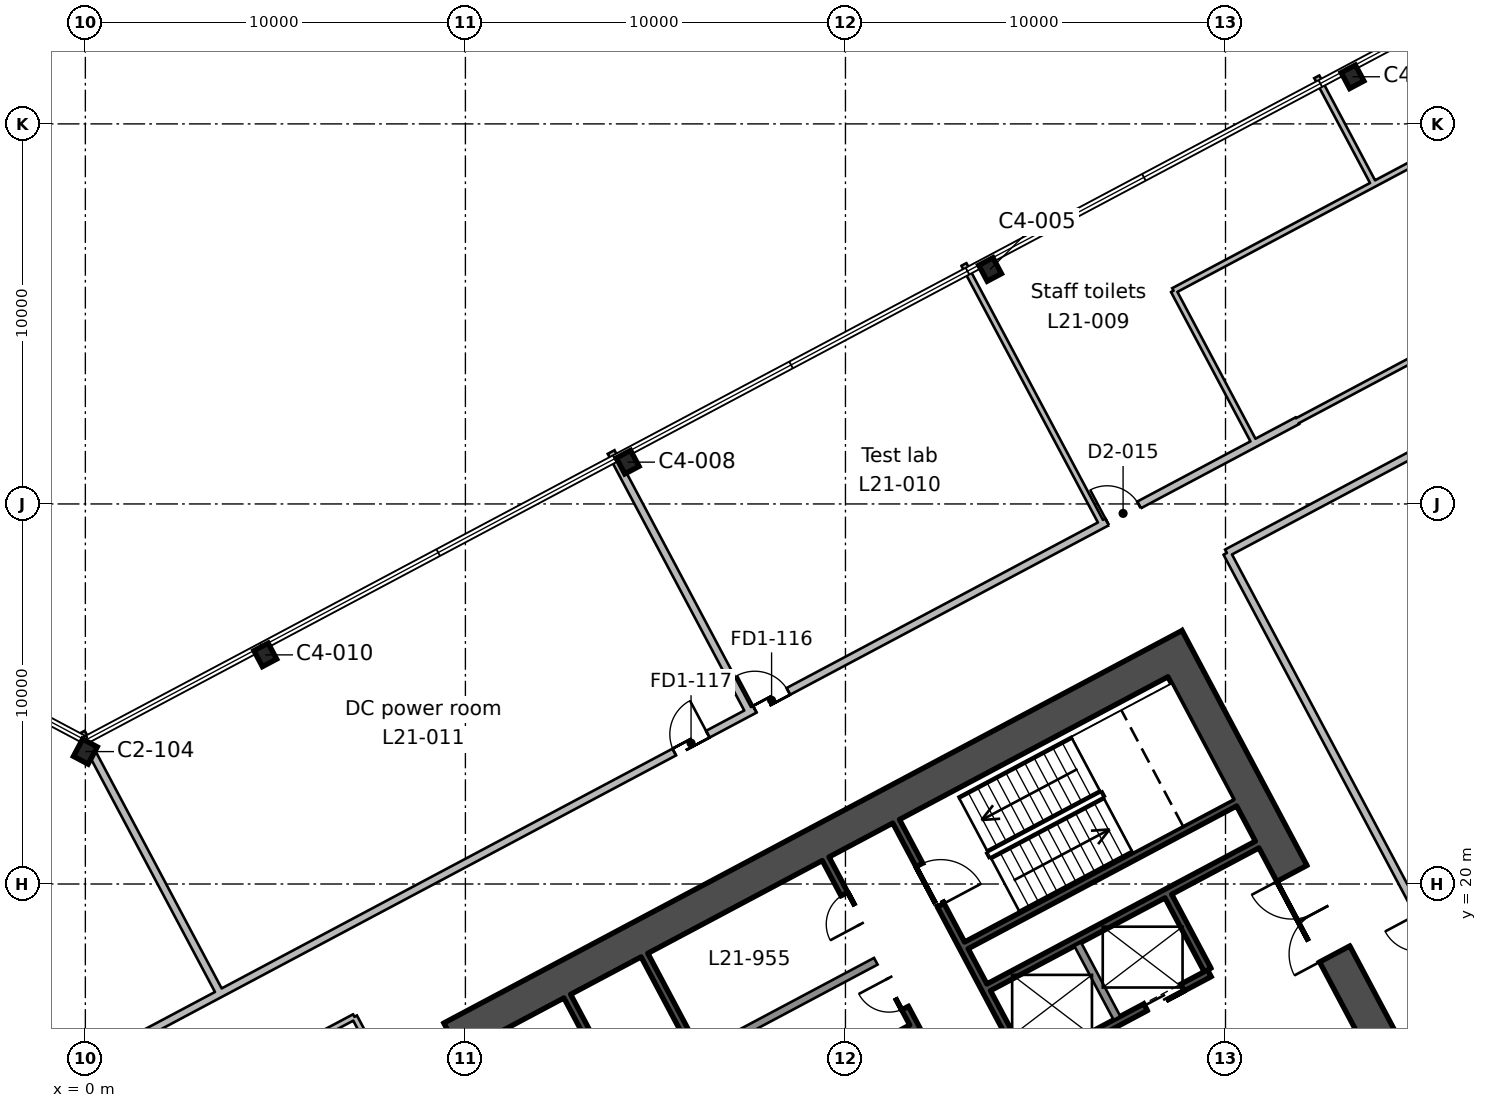
"""IFC4 building model, lengths in metres.
Left out: names, types, materials, properties, quantities, classifications, styles, units other than length and angle.
Written with IfcOpenShell. Run it as: python <this file> out.ifc"""

import sys

from ifc_helpers import new_model, si_unit, direction, frame, frame_2d, origin, origin_2d, place, context, subcontext, project, spatial, rectangle, i_section, extrude, element, fill, save


model = new_model("IFC4")
c1 = context("Model", 3, precision=1e-05, world=origin(), true_north=direction((0.0, 1.0)))
c2 = subcontext(c1, "Body", "Model", "MODEL_VIEW")
j1 = project(units=[si_unit("LENGTHUNIT", "METRE"), si_unit("PLANEANGLEUNIT", "RADIAN")], contexts=[c1])
p1 = place(None, origin())
s1 = spatial("IfcSite", under=j1, at=p1, CompositionType="ELEMENT")
p2 = place(p1, origin())
s2 = spatial("IfcBuilding", under=s1, at=p2, CompositionType="ELEMENT")
p3 = place(p2, frame((0.0, 0.0, 107.6)))
s3 = spatial("IfcBuildingStorey", under=s2, at=p3, CompositionType="ELEMENT", Elevation=107.6)
p4 = place(p3, frame((0.0, 23.484, 0.0), z_axis=(0.0, 0.0, 1.0), x_axis=(-0.882947592859, 0.469471562786, 0.0)))
e1 = element("IfcColumn", 1, at=p4, inside=s3, PredefinedType="COLUMN", context=c2, shape_type="SweptSolid", body=[
    extrude(i_section(OverallWidth=0.437, OverallDepth=0.513, WebThickness=0.061, FlangeThickness=0.097, FilletRadius=0.015, at=origin_2d()), origin(), (0.0, 0.0, 1.0), 4.6),
])
for number, where, z_axis, x_axis in (
    (2, (4.734, 26.029, 0.0), (0.0, 0.0, 1.0), (-0.883, -0.469, 0.0)),
    (3, (14.27, 31.1, 0.0), (0.0, 0.0, 1.0), (-0.883, -0.469, 0.0)),
    (4, (23.806, 36.17, 0.0), (0.0, 0.0, 1.0), (-0.883, -0.469, 0.0)),
    (5, (33.342, 41.24, 0.0), (0.0, 0.0, 1.0), (-0.883, -0.469, 0.0)),
):
    element("IfcColumn", number, at=place(p3, frame(where, z_axis=z_axis, x_axis=x_axis)), inside=s3, PredefinedType="COLUMN", context=c2, shape_type="SweptSolid", body=[
        extrude(i_section(OverallWidth=0.424, OverallDepth=0.475, WebThickness=0.048, FlangeThickness=0.077, FilletRadius=0.015, at=origin_2d()), origin(), (0.0, 0.0, 1.0), 4.6),
    ])
p5 = place(p3, frame((19.219, -1.107, 0.0), z_axis=(0.0, 0.0, 1.0), x_axis=(-0.46947084998, 0.882947971864, 0.0)))
e6 = element("IfcWall", 6, at=p5, inside=s3, PredefinedType="SHEAR", context=c2, shape_type="SweptSolid", body=[
    extrude(rectangle(XDim=20.0, YDim=0.9, at=frame_2d((10.0, 0.0))), origin(), (0.0, 0.0, 1.0), 4.6),
])
p6 = place(p5, frame((7.0, 0.0, 0.0)))
e7 = element("IfcOpeningElement", 7, at=p6, cuts=e6, PredefinedType="OPENING", context=c2, shape_type="SweptSolid", body=[
    extrude(rectangle(XDim=2.4, YDim=2.4, at=frame_2d((1.2, 1.2))), frame((0.0, 0.46, 0.0), z_axis=(0.0, -1.0, 0.0), x_axis=(1.0, 0.0, 0.0)), (0.0, 0.0, 1.0), 0.92),
])
p7 = place(p3, frame((37.849, 8.799, 0.0), z_axis=(0.0, 0.0, 1.0), x_axis=(-0.469465789982, 0.882950662289, 0.0)))
e8 = element("IfcWall", 8, at=p7, inside=s3, PredefinedType="SHEAR", context=c2, shape_type="SweptSolid", body=[
    extrude(rectangle(XDim=20.0, YDim=0.9, at=frame_2d((10.0, 0.0))), origin(), (0.0, 0.0, 1.0), 4.6),
])
p8 = place(p7, frame((10.6, 0.0, 0.0)))
e9 = element("IfcOpeningElement", 9, at=p8, cuts=e8, PredefinedType="OPENING", context=c2, shape_type="SweptSolid", body=[
    extrude(rectangle(XDim=2.4, YDim=2.4, at=frame_2d((1.2, 1.2))), frame((0.0, 0.46, 0.0), z_axis=(0.0, -1.0, 0.0), x_axis=(1.0, 0.0, 0.0)), (0.0, 0.0, 1.0), 0.92),
])
p9 = place(p3, frame((10.438, 16.366, 0.0), z_axis=(0.0, 0.0, 1.0), x_axis=(0.88294509198, 0.469476266226, 0.0)))
e10 = element("IfcWall", 10, at=p9, inside=s3, PredefinedType="SHEAR", context=c2, shape_type="SweptSolid", body=[
    extrude(rectangle(XDim=20.2, YDim=0.9, at=frame_2d((10.1, 0.0))), origin(), (0.0, 0.0, 1.0), 4.6),
])
p10 = place(p3, frame((14.394, 13.826, 0.0), z_axis=(0.0, 0.0, 1.0), x_axis=(-0.469494272526, 0.882935517501, 0.0)))
e11 = element("IfcWall", 11, at=p10, inside=s3, PredefinedType="SHEAR", context=c2, shape_type="SweptSolid", body=[
    extrude(rectangle(XDim=3.65, YDim=0.2, at=frame_2d((1.825, 0.0))), origin(), (0.0, 0.0, 1.0), 4.6),
])
p11 = place(p3, frame((18.138, 11.683, 0.0), z_axis=(0.0, 0.0, 1.0), x_axis=(-0.469480409012, 0.88294288918, 0.0)))
e12 = element("IfcWall", 12, at=p11, inside=s3, PredefinedType="SHEAR", context=c2, shape_type="SweptSolid", body=[
    extrude(rectangle(XDim=7.3, YDim=0.2, at=frame_2d((3.65, 0.0))), origin(), (0.0, 0.0, 1.0), 4.6),
])
p12 = place(p3, frame((22.906, 14.218, 0.0), z_axis=(0.0, 0.0, 1.0), x_axis=(-0.469480409012, 0.88294288918, 0.0)))
e13 = element("IfcWall", 13, at=p12, inside=s3, PredefinedType="SHEAR", context=c2, shape_type="SweptSolid", body=[
    extrude(rectangle(XDim=7.3, YDim=0.2, at=frame_2d((3.65, 0.0))), origin(), (0.0, 0.0, 1.0), 4.6),
])
p13 = place(p12, frame((2.85, 0.0, 0.0)))
e14 = element("IfcOpeningElement", 14, at=p13, cuts=e13, PredefinedType="OPENING", context=c2, shape_type="SweptSolid", body=[
    extrude(rectangle(XDim=0.9, YDim=2.1, at=frame_2d((0.45, 1.05))), frame((0.0, 0.11, 0.0), z_axis=(0.0, -1.0, 0.0), x_axis=(1.0, 0.0, 0.0)), (0.0, 0.0, 1.0), 0.22),
])
p14 = place(p12, frame((5.35, 0.0, 0.0)))
e15 = element("IfcOpeningElement", 15, at=p14, cuts=e13, PredefinedType="OPENING", context=c2, shape_type="SweptSolid", body=[
    extrude(rectangle(XDim=0.9, YDim=2.1, at=frame_2d((0.45, 1.05))), frame((0.0, 0.11, 0.0), z_axis=(0.0, -1.0, 0.0), x_axis=(1.0, 0.0, 0.0)), (0.0, 0.0, 1.0), 0.22),
])
p15 = place(p3, frame((24.76, 15.204, 0.0), z_axis=(0.0, 0.0, 1.0), x_axis=(-0.469494272526, 0.882935517501, 0.0)))
e16 = element("IfcWall", 16, at=p15, inside=s3, PredefinedType="SHEAR", context=c2, shape_type="SweptSolid", body=[
    extrude(rectangle(XDim=7.3, YDim=0.2, at=frame_2d((3.65, 0.0))), origin(), (0.0, 0.0, 1.0), 4.6),
])
p16 = place(p15, frame((4.8, 0.0, 0.0)))
e17 = element("IfcOpeningElement", 17, at=p16, cuts=e16, PredefinedType="OPENING", context=c2, shape_type="SweptSolid", body=[
    extrude(rectangle(XDim=1.2, YDim=2.1, at=frame_2d((0.6, 1.05))), frame((0.0, 0.11, 0.0), z_axis=(0.0, -1.0, 0.0), x_axis=(1.0, 0.0, 0.0)), (0.0, 0.0, 1.0), 0.22),
])
p17 = place(p3, frame((27.144, 16.471, 0.0), z_axis=(0.0, 0.0, 1.0), x_axis=(-0.469401318492, 0.882984938828, 0.0)))
e18 = element("IfcWall", 18, at=p17, inside=s3, PredefinedType="SOLIDWALL", context=c2, shape_type="SweptSolid", body=[
    extrude(rectangle(XDim=2.2, YDim=0.2, at=frame_2d((1.1, 0.0))), origin(), (0.0, 0.0, 1.0), 4.6),
])
p18 = place(p3, frame((29.528, 17.739, 0.0), z_axis=(0.0, 0.0, 1.0), x_axis=(-0.469401318492, 0.882984938828, 0.0)))
e19 = element("IfcWall", 19, at=p18, inside=s3, PredefinedType="SHEAR", context=c2, shape_type="SweptSolid", body=[
    extrude(rectangle(XDim=2.2, YDim=0.2, at=frame_2d((1.1, 0.0))), origin(), (0.0, 0.0, 1.0), 4.6),
])
p19 = place(p3, frame((24.807, 15.116, 0.0), z_axis=(0.0, 0.0, 1.0), x_axis=(0.882942972946, 0.469480251476, 0.0)))
e20 = element("IfcWall", 20, at=p19, inside=s3, PredefinedType="SHEAR", context=c2, shape_type="SweptSolid", body=[
    extrude(rectangle(XDim=5.4, YDim=0.2, at=frame_2d((2.7, 0.0))), origin(), (0.0, 0.0, 1.0), 4.6),
])
p20 = place(p19, frame((0.8, 0.0, 0.0)))
e21 = element("IfcOpeningElement", 21, at=p20, cuts=e20, PredefinedType="OPENING", context=c2, shape_type="SweptSolid", body=[
    extrude(rectangle(XDim=1.1, YDim=2.1, at=frame_2d((0.55, 1.05))), frame((0.0, 0.11, 0.0), z_axis=(0.0, -1.0, 0.0), x_axis=(1.0, 0.0, 0.0)), (0.0, 0.0, 1.0), 0.22),
])
p21 = place(p19, frame((3.5, 0.0, 0.0)))
e22 = element("IfcOpeningElement", 22, at=p21, cuts=e20, PredefinedType="OPENING", context=c2, shape_type="SweptSolid", body=[
    extrude(rectangle(XDim=1.1, YDim=2.1, at=frame_2d((0.55, 1.05))), frame((0.0, 0.11, 0.0), z_axis=(0.0, -1.0, 0.0), x_axis=(1.0, 0.0, 0.0)), (0.0, 0.0, 1.0), 0.22),
])
p22 = place(p3, frame((17.147, 13.761, 0.0), z_axis=(0.0, 0.0, 1.0), x_axis=(0.882964314875, 0.469440111896, 0.0)))
e23 = element("IfcWall", 23, at=p22, inside=s3, PredefinedType="SHEAR", context=c2, shape_type="SweptSolid", body=[
    extrude(rectangle(XDim=5.2, YDim=0.2, at=frame_2d((2.6, 0.0))), origin(), (0.0, 0.0, 1.0), 4.6),
])
p23 = place(p3, frame((23.769, 17.282, 0.0), z_axis=(0.0, 0.0, 1.0), x_axis=(0.882940221191, 0.469485426614, 0.0)))
e24 = element("IfcWall", 24, at=p23, inside=s3, PredefinedType="SHEAR", context=c2, shape_type="SweptSolid", body=[
    extrude(rectangle(XDim=8.0, YDim=0.2, at=frame_2d((4.0, 0.0))), origin(), (0.0, 0.0, 1.0), 4.6),
])
p24 = place(p3, frame((23.182, 18.385, 0.0), z_axis=(0.0, 0.0, 1.0), x_axis=(0.88295287151, 0.469461634952, 0.0)))
e25 = element("IfcWall", 25, at=p24, inside=s3, PredefinedType="SHEAR", context=c2, shape_type="SweptSolid", body=[
    extrude(rectangle(XDim=8.0, YDim=0.2, at=frame_2d((4.0, 0.0))), origin(), (0.0, 0.0, 1.0), 4.6),
])
p25 = place(p3, frame((16.208, 15.527, 0.0), z_axis=(0.0, 0.0, 1.0), x_axis=(0.882953967957, 0.469459572775, 0.0)))
e26 = element("IfcWall", 26, at=p25, inside=s3, PredefinedType="SOLIDWALL", context=c2, shape_type="SweptSolid", body=[
    extrude(rectangle(XDim=5.2, YDim=0.2, at=frame_2d((2.6, 0.0))), origin(), (0.0, 0.0, 1.0), 4.6),
])
p26 = place(p3, frame((-32.541, 32.535, 0.0), z_axis=(0.0, 0.0, 1.0), x_axis=(0.882951675281, -0.469463884787, 0.0)))
e27 = element("IfcWall", 27, at=p26, inside=s3, PredefinedType="PARTITIONING", context=c2, shape_type="SweptSolid", body=[
    extrude(rectangle(XDim=36.855, YDim=0.2, at=frame_2d((18.427, 0.0))), origin(), (0.0, 0.0, 1.0), 4.15),
])
p27 = place(p26, frame((17.95, 0.0, 0.0)))
e28 = element("IfcOpeningElement", 28, at=p27, cuts=e27, PredefinedType="OPENING", context=c2, shape_type="SweptSolid", body=[
    extrude(rectangle(XDim=1.0, YDim=2.1, at=frame_2d((0.5, 1.05))), frame((0.0, 0.11, 0.0), z_axis=(0.0, -1.0, 0.0), x_axis=(1.0, 0.0, 0.0)), (0.0, 0.0, 1.0), 0.22),
])
p28 = place(p26, frame((14.75, 0.0, 0.0)))
e29 = element("IfcOpeningElement", 29, at=p28, cuts=e27, PredefinedType="OPENING", context=c2, shape_type="SweptSolid", body=[
    extrude(rectangle(XDim=1.0, YDim=2.1, at=frame_2d((0.5, 1.05))), frame((0.0, 0.11, 0.0), z_axis=(0.0, -1.0, 0.0), x_axis=(1.0, 0.0, 0.0)), (0.0, 0.0, 1.0), 0.22),
])
p29 = place(p3, frame((0.0, 15.233, 0.0), z_axis=(0.0, 0.0, 1.0), x_axis=(0.882948052406, 0.469470698502, 0.0)))
e30 = element("IfcWall", 30, at=p29, inside=s3, PredefinedType="PARTITIONING", context=c2, shape_type="SweptSolid", body=[
    extrude(rectangle(XDim=36.115, YDim=0.2, at=frame_2d((18.058, 0.0))), origin(), (0.0, 0.0, 1.0), 4.15),
])
p30 = place(p29, frame((30.45, 0.0, 0.0)))
e31 = element("IfcOpeningElement", 31, at=p30, cuts=e30, PredefinedType="OPENING", context=c2, shape_type="SweptSolid", body=[
    extrude(rectangle(XDim=0.95, YDim=2.1, at=frame_2d((0.475, 1.05))), frame((0.0, 0.11, 0.0), z_axis=(0.0, -1.0, 0.0), x_axis=(1.0, 0.0, 0.0)), (0.0, 0.0, 1.0), 0.22),
])
p31 = place(p29, frame((19.95, 0.0, 0.0)))
e32 = element("IfcOpeningElement", 32, at=p31, cuts=e30, PredefinedType="OPENING", context=c2, shape_type="SweptSolid", body=[
    extrude(rectangle(XDim=1.0, YDim=2.1, at=frame_2d((0.5, 1.05))), frame((0.0, 0.11, 0.0), z_axis=(0.0, -1.0, 0.0), x_axis=(1.0, 0.0, 0.0)), (0.0, 0.0, 1.0), 0.22),
])
p32 = place(p29, frame((17.55, 0.0, 0.0)))
e33 = element("IfcOpeningElement", 33, at=p32, cuts=e30, PredefinedType="OPENING", context=c2, shape_type="SweptSolid", body=[
    extrude(rectangle(XDim=1.0, YDim=2.1, at=frame_2d((0.5, 1.05))), frame((0.0, 0.11, 0.0), z_axis=(0.0, -1.0, 0.0), x_axis=(1.0, 0.0, 0.0)), (0.0, 0.0, 1.0), 0.22),
])
p33 = place(p3, frame((-0.105, 23.984, 0.0), z_axis=(0.0, 0.0, 1.0), x_axis=(0.469391658377, -0.882990074149, 0.0)))
e34 = element("IfcWall", 34, at=p33, inside=s3, PredefinedType="PARTITIONING", context=c2, shape_type="SweptSolid", body=[
    extrude(rectangle(XDim=7.776, YDim=0.2, at=frame_2d((3.888, 0.0))), origin(), (0.0, 0.0, 1.0), 4.15),
])
p34 = place(p3, frame((13.834, 31.366, 0.0), z_axis=(0.0, 0.0, 1.0), x_axis=(0.469415477281, -0.882977411766, 0.0)))
e35 = element("IfcWall", 35, at=p34, inside=s3, PredefinedType="PARTITIONING", context=c2, shape_type="SweptSolid", body=[
    extrude(rectangle(XDim=7.75, YDim=0.2, at=frame_2d((3.875, 0.0))), origin(), (0.0, 0.0, 1.0), 4.15),
])
p35 = place(p3, frame((62.372, 17.93, 0.0), z_axis=(0.0, 0.0, 1.0), x_axis=(-0.88295234377, -0.469462627513, 0.0)))
e36 = element("IfcWall", 36, at=p35, inside=s3, PredefinedType="PARTITIONING", context=c2, shape_type="SweptSolid", body=[
    extrude(rectangle(XDim=55.237, YDim=0.2, at=frame_2d((27.619, 0.0))), origin(), (0.0, 0.0, 1.0), 4.15),
])
p36 = place(p35, frame((38.75, 0.0, 0.0)))
e37 = element("IfcOpeningElement", 37, at=p36, cuts=e36, PredefinedType="OPENING", context=c2, shape_type="SweptSolid", body=[
    extrude(rectangle(XDim=1.0, YDim=2.1, at=frame_2d((0.5, 1.05))), frame((0.0, 0.11, 0.0), z_axis=(0.0, -1.0, 0.0), x_axis=(1.0, 0.0, 0.0)), (0.0, 0.0, 1.0), 0.22),
])
p37 = place(p35, frame((27.15, 0.0, 0.0)))
e38 = element("IfcOpeningElement", 38, at=p37, cuts=e36, PredefinedType="OPENING", context=c2, shape_type="SweptSolid", body=[
    extrude(rectangle(XDim=1.0, YDim=2.1, at=frame_2d((0.5, 1.05))), frame((0.0, 0.11, 0.0), z_axis=(0.0, -1.0, 0.0), x_axis=(1.0, 0.0, 0.0)), (0.0, 0.0, 1.0), 0.22),
])
p38 = place(p35, frame((20.85, 0.0, 0.0)))
e39 = element("IfcOpeningElement", 39, at=p38, cuts=e36, PredefinedType="OPENING", context=c2, shape_type="SweptSolid", body=[
    extrude(rectangle(XDim=1.0, YDim=2.1, at=frame_2d((0.5, 1.05))), frame((0.0, 0.11, 0.0), z_axis=(0.0, -1.0, 0.0), x_axis=(1.0, 0.0, 0.0)), (0.0, 0.0, 1.0), 0.22),
])
p39 = place(p3, frame((23.117, 36.302, 0.0), z_axis=(0.0, 0.0, 1.0), x_axis=(0.469538267285, -0.882912122215, 0.0)))
e40 = element("IfcWall", 40, at=p39, inside=s3, PredefinedType="PARTITIONING", context=c2, shape_type="SweptSolid", body=[
    extrude(rectangle(XDim=7.75, YDim=0.15, at=frame_2d((3.875, 0.0))), origin(), (0.0, 0.0, 1.0), 4.15),
])
p40 = place(p3, frame((30.761, 31.608, 0.0), z_axis=(0.0, 0.0, 1.0), x_axis=(-0.469369141446, 0.883002043632, 0.0)))
e41 = element("IfcWall", 41, at=p40, inside=s3, PredefinedType="PARTITIONING", context=c2, shape_type="SweptSolid", body=[
    extrude(rectangle(XDim=4.534, YDim=0.15, at=frame_2d((2.267, 0.0))), origin(), (0.0, 0.0, 1.0), 4.15),
])
p41 = place(p3, frame((28.633, 35.611, 0.0), z_axis=(0.0, 0.0, 1.0), x_axis=(0.882899375274, 0.469562235642, 0.0)))
e42 = element("IfcWall", 42, at=p41, inside=s3, PredefinedType="PARTITIONING", context=c2, shape_type="SweptSolid", body=[
    extrude(rectangle(XDim=5.905, YDim=0.15, at=frame_2d((2.953, 0.0))), origin(), (0.0, 0.0, 1.0), 4.15),
])
p42 = place(p3, frame((31.888, 32.188, 0.0), z_axis=(0.0, 0.0, 1.0), x_axis=(0.882949135821, 0.469468660884, 0.0)))
e43 = element("IfcWall", 43, at=p42, inside=s3, PredefinedType="PARTITIONING", context=c2, shape_type="SweptSolid", body=[
    extrude(rectangle(XDim=21.184, YDim=0.15, at=frame_2d((10.592, 0.0))), origin(), (0.0, 0.0, 1.0), 4.15),
])
p43 = place(p42, frame((10.05, 0.0, 0.0)))
e44 = element("IfcOpeningElement", 44, at=p43, cuts=e43, PredefinedType="OPENING", context=c2, shape_type="SweptSolid", body=[
    extrude(rectangle(XDim=1.0, YDim=2.1, at=frame_2d((0.5, 1.05))), frame((0.0, 0.085, 0.0), z_axis=(0.0, -1.0, 0.0), x_axis=(1.0, 0.0, 0.0)), (0.0, 0.0, 1.0), 0.17),
])
p44 = place(p3, frame((32.402, 41.239, 0.0), z_axis=(0.0, 0.0, 1.0), x_axis=(0.469447181805, -0.882960556025, 0.0)))
e45 = element("IfcWall", 45, at=p44, inside=s3, PredefinedType="PARTITIONING", context=c2, shape_type="SweptSolid", body=[
    extrude(rectangle(XDim=3.199, YDim=0.15, at=frame_2d((1.6, 0.0))), origin(), (0.0, 0.0, 1.0), 4.15),
])
p45 = place(p3, frame((33.847, 38.384, 0.0), z_axis=(0.0, 0.0, 1.0), x_axis=(0.882976275084, 0.469417615391, 0.0)))
e46 = element("IfcWall", 46, at=p45, inside=s3, PredefinedType="PARTITIONING", context=c2, shape_type="SweptSolid", body=[
    extrude(rectangle(XDim=18.094, YDim=0.15, at=frame_2d((9.047, 0.0))), origin(), (0.0, 0.0, 1.0), 4.15),
])
p46 = place(p3, frame((40.599, 8.846, 0.0), z_axis=(0.0, 0.0, 1.0), x_axis=(-0.469482321543, 0.882941872242, 0.0)))
e47 = element("IfcWall", 47, at=p46, inside=s3, PredefinedType="PARTITIONING", context=c2, shape_type="SweptSolid", body=[
    extrude(rectangle(XDim=22.5, YDim=0.2, at=frame_2d((11.25, 0.0))), origin(), (0.0, 0.0, 1.0), 4.15),
])
p47 = place(p46, frame((10.75, 0.0, 0.0)))
e48 = element("IfcOpeningElement", 48, at=p47, cuts=e47, PredefinedType="OPENING", context=c2, shape_type="SweptSolid", body=[
    extrude(rectangle(XDim=1.0, YDim=2.1, at=frame_2d((0.5, 1.05))), frame((0.0, 0.11, 0.0), z_axis=(0.0, -1.0, 0.0), x_axis=(1.0, 0.0, 0.0)), (0.0, 0.0, 1.0), 0.22),
])
p48 = place(p3, frame((30.036, 28.712, 0.0), z_axis=(0.0, 0.0, 1.0), x_axis=(0.882948586986, 0.469469693099, 0.0)))
e49 = element("IfcWall", 49, at=p48, inside=s3, PredefinedType="PARTITIONING", context=c2, shape_type="SweptSolid", body=[
    extrude(rectangle(XDim=13.452, YDim=0.2, at=frame_2d((6.726, 0.0))), origin(), (0.0, 0.0, 1.0), 4.15),
])
p49 = place(p3, frame((8.625, 13.6, 0.0), z_axis=(0.0, 0.0, 1.0), x_axis=(-0.469417352915, 0.882976414624, 0.0)))
e50 = element("IfcWall", 50, at=p49, inside=s3, PredefinedType="PARTITIONING", context=c2, shape_type="SweptSolid", body=[
    extrude(rectangle(XDim=3.291, YDim=0.15, at=frame_2d((1.646, 0.0))), origin(), (0.0, 0.0, 1.0), 4.15),
])
p50 = place(p3, frame((7.08, 16.506, 0.0), z_axis=(0.0, 0.0, 1.0), x_axis=(-0.882936403153, -0.469492606957, 0.0)))
e51 = element("IfcWall", 51, at=p50, inside=s3, PredefinedType="PARTITIONING", context=c2, shape_type="SweptSolid", body=[
    extrude(rectangle(XDim=6.19, YDim=0.15, at=frame_2d((3.095, 0.0))), origin(), (0.0, 0.0, 1.0), 4.15),
])
p51 = place(p8, origin())
e52 = element("IfcDoor", 52, at=p51, inside=s3, OperationType="DOUBLE_DOOR_SINGLE_SWING", PredefinedType="DOOR", context=c2, shape_type="SweptSolid", body=[
    extrude(rectangle(XDim=2.4, YDim=2.4, at=frame_2d((1.2, 1.2))), frame((0.0, 0.025, 0.0), z_axis=(0.0, -1.0, 0.0), x_axis=(1.0, 0.0, 0.0)), (0.0, 0.0, 1.0), 0.05),
])
fill(e9, e52)
p52 = place(p16, frame((1.2, 0.0, 0.0), z_axis=(0.0, 0.0, 1.0), x_axis=(-1.0, 0.0, 0.0)))
e53 = element("IfcDoor", 53, at=p52, inside=s3, OperationType="SINGLE_SWING_RIGHT", PredefinedType="DOOR", context=c2, shape_type="SweptSolid", body=[
    extrude(rectangle(XDim=1.2, YDim=2.1, at=frame_2d((0.6, 1.05))), frame((0.0, 0.025, 0.0), z_axis=(0.0, -1.0, 0.0), x_axis=(1.0, 0.0, 0.0)), (0.0, 0.0, 1.0), 0.05),
])
fill(e17, e53)
p53 = place(p21, origin())
e54 = element("IfcDoor", 54, at=p53, inside=s3, OperationType="DOUBLE_DOOR_SLIDING", PredefinedType="DOOR", context=c2, shape_type="SweptSolid", body=[
    extrude(rectangle(XDim=1.1, YDim=2.1, at=frame_2d((0.55, 1.05))), frame((0.0, 0.025, 0.0), z_axis=(0.0, -1.0, 0.0), x_axis=(1.0, 0.0, 0.0)), (0.0, 0.0, 1.0), 0.05),
])
fill(e22, e54)
p54 = place(p13, origin())
e55 = element("IfcDoor", 55, at=p54, inside=s3, OperationType="SINGLE_SWING_RIGHT", PredefinedType="DOOR", context=c2, shape_type="SweptSolid", body=[
    extrude(rectangle(XDim=0.9, YDim=2.1, at=frame_2d((0.45, 1.05))), frame((0.0, 0.025, 0.0), z_axis=(0.0, -1.0, 0.0), x_axis=(1.0, 0.0, 0.0)), (0.0, 0.0, 1.0), 0.05),
])
fill(e14, e55)
p55 = place(p14, origin())
e56 = element("IfcDoor", 56, at=p55, inside=s3, OperationType="SINGLE_SWING_LEFT", PredefinedType="DOOR", context=c2, shape_type="SweptSolid", body=[
    extrude(rectangle(XDim=0.9, YDim=2.1, at=frame_2d((0.45, 1.05))), frame((0.0, 0.025, 0.0), z_axis=(0.0, -1.0, 0.0), x_axis=(1.0, 0.0, 0.0)), (0.0, 0.0, 1.0), 0.05),
])
fill(e15, e56)
p56 = place(p30, origin())
e57 = element("IfcDoor", 57, at=p56, inside=s3, OperationType="SINGLE_SWING_LEFT", PredefinedType="DOOR", context=c2, shape_type="SweptSolid", body=[
    extrude(rectangle(XDim=0.95, YDim=2.1, at=frame_2d((0.475, 1.05))), frame((0.0, 0.025, 0.0), z_axis=(0.0, -1.0, 0.0), x_axis=(1.0, 0.0, 0.0)), (0.0, 0.0, 1.0), 0.05),
])
fill(e31, e57)
p57 = place(p31, origin())
e58 = element("IfcDoor", 58, at=p57, inside=s3, OperationType="SINGLE_SWING_LEFT", PredefinedType="DOOR", context=c2, shape_type="SweptSolid", body=[
    extrude(rectangle(XDim=1.0, YDim=2.1, at=frame_2d((0.5, 1.05))), frame((0.0, 0.025, 0.0), z_axis=(0.0, -1.0, 0.0), x_axis=(1.0, 0.0, 0.0)), (0.0, 0.0, 1.0), 0.05),
])
fill(e32, e58)
p58 = place(p32, origin())
e59 = element("IfcDoor", 59, at=p58, inside=s3, OperationType="SINGLE_SWING_RIGHT", PredefinedType="DOOR", context=c2, shape_type="SweptSolid", body=[
    extrude(rectangle(XDim=1.0, YDim=2.1, at=frame_2d((0.5, 1.05))), frame((0.0, 0.025, 0.0), z_axis=(0.0, -1.0, 0.0), x_axis=(1.0, 0.0, 0.0)), (0.0, 0.0, 1.0), 0.05),
])
fill(e33, e59)
save(model, sys.argv[1])
